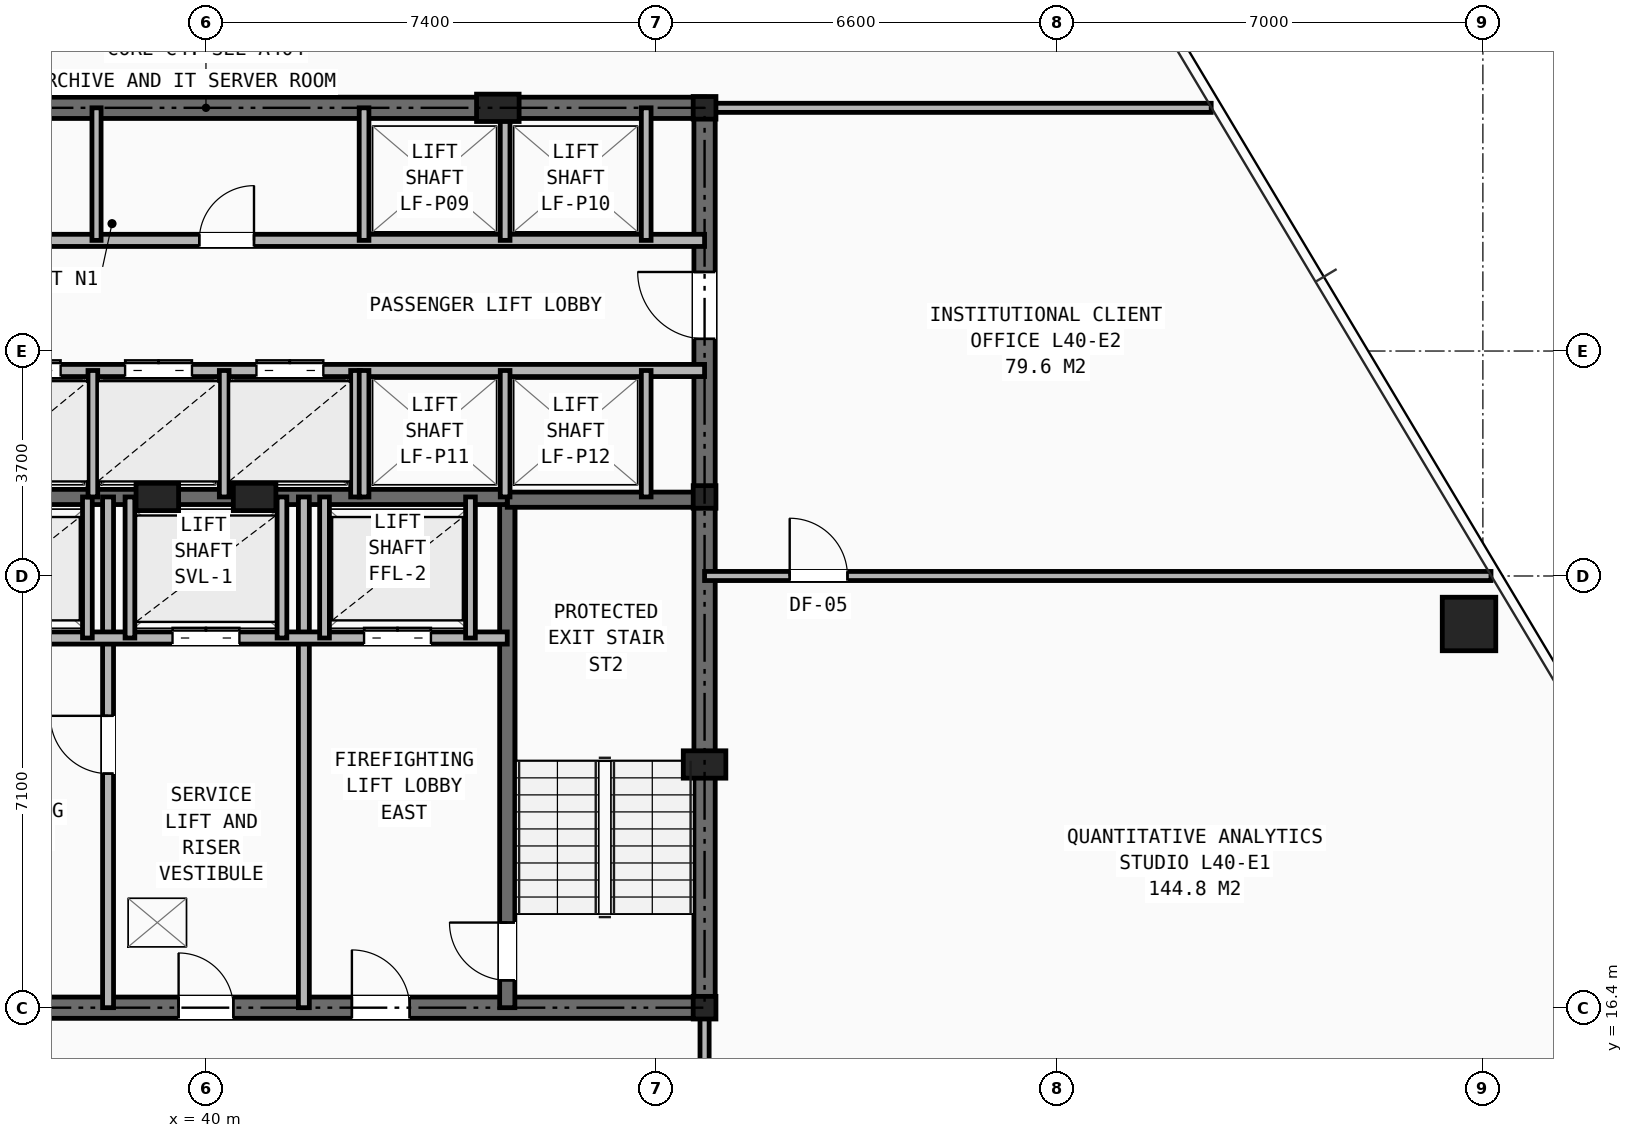
"""IFC4 building model, lengths in metres.
Left out: names, types, materials, properties, quantities, classifications, styles, units other than length and angle.
Written with IfcOpenShell. Run it as: python <this file> out.ifc"""

import sys

from ifc_helpers import new_model, si_unit, direction, frame, frame_2d, origin, origin_2d, place, context, subcontext, project, spatial, rectangle, hollow_rectangle, i_section, extrude, element, fill, save


model = new_model("IFC4")
c1 = context("Model", 3, precision=1e-05, world=origin(), true_north=direction((0.0, 1.0)))
c2 = subcontext(c1, "Body", "Model", "MODEL_VIEW")
j1 = project(units=[si_unit("LENGTHUNIT", "METRE"), si_unit("PLANEANGLEUNIT", "RADIAN")], contexts=[c1])
p1 = place(None, origin())
s1 = spatial("IfcSite", under=j1, at=p1, CompositionType="ELEMENT")
p2 = place(p1, origin())
s2 = spatial("IfcBuilding", under=s1, at=p2, CompositionType="ELEMENT")
p3 = place(p2, frame((0.0, 0.0, 140.15)))
s3 = spatial("IfcBuildingStorey", under=s2, at=p3, CompositionType="ELEMENT", Elevation=140.15)
for number, where, z_axis, x_axis in (
    (1, (48.2, 16.4, 0.0), (0.0, 0.0, 1.0), (1.0, 0.0, 0.0)),
    (2, (48.2, 24.8, 0.0), (0.0, 0.0, 1.0), (1.0, 0.0, 0.0)),
    (3, (48.2, 31.2, 0.0), (0.0, 0.0, 1.0), (1.0, 0.0, 0.0)),
):
    element("IfcColumn", number, at=place(p3, frame(where, z_axis=z_axis, x_axis=x_axis)), inside=s3, PredefinedType="COLUMN", context=c2, shape_type="SweptSolid", body=[
        extrude(i_section(OverallWidth=0.374, OverallDepth=0.372, WebThickness=0.016, FlangeThickness=0.026, at=origin_2d()), origin(), (0.0, 0.0, 1.0), 3.45),
    ])
for number, where, z_axis, x_axis in (
    (4, (48.2, 20.4, 0.0), (0.0, 0.0, 1.0), (1.0, 0.0, 0.0)),
    (5, (44.8, 31.2, 0.0), (0.0, 0.0, 1.0), (1.0, 0.0, 0.0)),
    (6, (39.2, 24.8, 0.0), (0.0, 0.0, 1.0), (1.0, 0.0, 0.0)),
    (7, (40.8, 24.8, 0.0), (0.0, 0.0, 1.0), (1.0, 0.0, 0.0)),
):
    element("IfcColumn", number, at=place(p3, frame(where, z_axis=z_axis, x_axis=x_axis)), inside=s3, PredefinedType="PILASTER", context=c2, shape_type="SweptSolid", body=[
        extrude(rectangle(XDim=0.7, YDim=0.45, at=origin_2d()), origin(), (0.0, 0.0, 1.0), 3.45),
    ])
p4 = place(p3, frame((60.772, 22.711, 0.0), z_axis=(0.0, 0.0, 1.0), x_axis=(1.0, 0.0, 0.0)))
e8 = element("IfcColumn", 8, at=p4, inside=s3, PredefinedType="COLUMN", context=c2, shape_type="SweptSolid", body=[
    extrude(hollow_rectangle(XDim=0.88, YDim=0.88, WallThickness=0.06, at=origin_2d()), origin(), (0.0, 0.0, 1.0), 3.45),
])
p5 = place(p3, frame((31.8, 16.4, 0.0), z_axis=(0.0, 0.0, 1.0), x_axis=(1.0, 0.0, 0.0)))
e9 = element("IfcWall", 9, at=p5, inside=s3, PredefinedType="SHEAR", context=c2, shape_type="SweptSolid", body=[
    extrude(rectangle(XDim=16.4, YDim=0.35, at=frame_2d((8.2, 0.0))), origin(), (0.0, 0.0, 1.0), 3.21),
])
p6 = place(p5, frame((7.75, 0.0, 0.0)))
e10 = element("IfcOpeningElement", 10, at=p6, cuts=e9, PredefinedType="OPENING", context=c2, shape_type="SweptSolid", body=[
    extrude(rectangle(XDim=0.9, YDim=2.1, at=frame_2d((0.45, 1.05))), frame((0.0, 0.185, 0.0), z_axis=(0.0, -1.0, 0.0), x_axis=(1.0, 0.0, 0.0)), (0.0, 0.0, 1.0), 0.37),
])
p7 = place(p5, frame((4.2, 0.0, 0.0)))
e11 = element("IfcOpeningElement", 11, at=p7, cuts=e9, PredefinedType="OPENING", context=c2, shape_type="SweptSolid", body=[
    extrude(rectangle(XDim=0.95, YDim=2.1, at=frame_2d((0.475, 1.05))), frame((0.0, 0.185, 0.0), z_axis=(0.0, -1.0, 0.0), x_axis=(1.0, 0.0, 0.0)), (0.0, 0.0, 1.0), 0.37),
])
p8 = place(p5, frame((10.6, 0.0, 0.0)))
e12 = element("IfcOpeningElement", 12, at=p8, cuts=e9, PredefinedType="OPENING", context=c2, shape_type="SweptSolid", body=[
    extrude(rectangle(XDim=0.95, YDim=2.1, at=frame_2d((0.475, 1.05))), frame((0.0, 0.185, 0.0), z_axis=(0.0, -1.0, 0.0), x_axis=(1.0, 0.0, 0.0)), (0.0, 0.0, 1.0), 0.37),
])
p9 = place(p3, frame((31.8, 31.2, 0.0), z_axis=(0.0, 0.0, 1.0), x_axis=(1.0, 0.0, 0.0)))
e13 = element("IfcWall", 13, at=p9, inside=s3, PredefinedType="SHEAR", context=c2, shape_type="SweptSolid", body=[
    extrude(rectangle(XDim=16.4, YDim=0.35, at=frame_2d((8.2, 0.0))), origin(), (0.0, 0.0, 1.0), 3.21),
])
p10 = place(p3, frame((48.2, 16.4, 0.0), z_axis=(0.0, 0.0, 1.0), x_axis=(0.0, 1.0, 0.0)))
e14 = element("IfcWall", 14, at=p10, inside=s3, PredefinedType="SHEAR", context=c2, shape_type="SweptSolid", body=[
    extrude(rectangle(XDim=14.8, YDim=0.35, at=frame_2d((7.4, 0.0))), origin(), (0.0, 0.0, 1.0), 3.21),
])
p11 = place(p10, frame((11.0, 0.0, 0.0)))
e15 = element("IfcOpeningElement", 15, at=p11, cuts=e14, PredefinedType="OPENING", context=c2, shape_type="SweptSolid", body=[
    extrude(rectangle(XDim=1.1, YDim=2.15, at=frame_2d((0.55, 1.075))), frame((0.0, 0.185, 0.0), z_axis=(0.0, -1.0, 0.0), x_axis=(1.0, 0.0, 0.0)), (0.0, 0.0, 1.0), 0.37),
])
p12 = place(p3, frame((44.955, 16.4, 0.0), z_axis=(0.0, 0.0, 1.0), x_axis=(0.0, 1.0, 0.0)))
e16 = element("IfcWall", 16, at=p12, inside=s3, PredefinedType="SHEAR", context=c2, shape_type="SweptSolid", body=[
    extrude(rectangle(XDim=8.4, YDim=0.25, at=frame_2d((4.2, 0.0))), origin(), (0.0, 0.0, 1.0), 3.21),
])
p13 = place(p12, frame((0.45, 0.0, 0.0)))
e17 = element("IfcOpeningElement", 17, at=p13, cuts=e16, PredefinedType="OPENING", context=c2, shape_type="SweptSolid", body=[
    extrude(rectangle(XDim=0.95, YDim=2.1, at=frame_2d((0.475, 1.05))), frame((0.0, 0.135, 0.0), z_axis=(0.0, -1.0, 0.0), x_axis=(1.0, 0.0, 0.0)), (0.0, 0.0, 1.0), 0.27),
])
p14 = place(p3, frame((44.955, 24.755, 0.0), z_axis=(0.0, 0.0, 1.0), x_axis=(1.0, 0.0, 0.0)))
e18 = element("IfcWall", 18, at=p14, inside=s3, PredefinedType="SHEAR", context=c2, shape_type="SweptSolid", body=[
    extrude(rectangle(XDim=3.245, YDim=0.25, at=frame_2d((1.623, 0.0))), origin(), (0.0, 0.0, 1.0), 3.21),
])
p15 = place(p3, frame((35.045, 24.8, 0.0), z_axis=(0.0, 0.0, 1.0), x_axis=(1.0, 0.0, 0.0)))
e19 = element("IfcWall", 19, at=p15, inside=s3, PredefinedType="SHEAR", context=c2, shape_type="SweptSolid", body=[
    extrude(rectangle(XDim=9.91, YDim=0.25, at=frame_2d((4.955, 0.0))), origin(), (0.0, 0.0, 1.0), 3.21),
])
p16 = place(p3, frame((38.39, 16.4, 0.0), z_axis=(0.0, 0.0, 1.0), x_axis=(0.0, 1.0, 0.0)))
e20 = element("IfcWall", 20, at=p16, inside=s3, PredefinedType="PARTITIONING", context=c2, shape_type="SweptSolid", body=[
    extrude(rectangle(XDim=8.4, YDim=0.18, at=frame_2d((4.2, 0.0))), origin(), (0.0, 0.0, 1.0), 2.938),
])
p17 = place(p16, frame((3.85, 0.0, 0.0)))
e21 = element("IfcOpeningElement", 21, at=p17, cuts=e20, PredefinedType="OPENING", context=c2, shape_type="SweptSolid", body=[
    extrude(rectangle(XDim=0.95, YDim=2.1, at=frame_2d((0.475, 1.05))), frame((0.0, 0.1, 0.0), z_axis=(0.0, -1.0, 0.0), x_axis=(1.0, 0.0, 0.0)), (0.0, 0.0, 1.0), 0.2),
])
p18 = place(p3, frame((41.61, 16.4, 0.0), z_axis=(0.0, 0.0, 1.0), x_axis=(0.0, 1.0, 0.0)))
e22 = element("IfcWall", 22, at=p18, inside=s3, PredefinedType="PARTITIONING", context=c2, shape_type="SweptSolid", body=[
    extrude(rectangle(XDim=8.4, YDim=0.18, at=frame_2d((4.2, 0.0))), origin(), (0.0, 0.0, 1.0), 2.938),
])
p19 = place(p3, frame((35.045, 22.48, 0.0), z_axis=(0.0, 0.0, 1.0), x_axis=(1.0, 0.0, 0.0)))
e23 = element("IfcWall", 23, at=p19, inside=s3, PredefinedType="SOLIDWALL", context=c2, shape_type="SweptSolid", body=[
    extrude(rectangle(XDim=9.91, YDim=0.2, at=frame_2d((4.955, 0.0))), origin(), (0.0, 0.0, 1.0), 3.21),
])
p20 = place(p19, frame((1.255, 0.0, 0.0)))
e24 = element("IfcOpeningElement", 24, at=p20, cuts=e23, PredefinedType="OPENING", context=c2, shape_type="SweptSolid", body=[
    extrude(rectangle(XDim=1.1, YDim=2.15, at=frame_2d((0.55, 1.075))), frame((0.0, 0.11, 0.0), z_axis=(0.0, -1.0, 0.0), x_axis=(1.0, 0.0, 0.0)), (0.0, 0.0, 1.0), 0.22),
])
p21 = place(p19, frame((7.555, 0.0, 0.0)))
e25 = element("IfcOpeningElement", 25, at=p21, cuts=e23, PredefinedType="OPENING", context=c2, shape_type="SweptSolid", body=[
    extrude(rectangle(XDim=1.1, YDim=2.15, at=frame_2d((0.55, 1.075))), frame((0.0, 0.11, 0.0), z_axis=(0.0, -1.0, 0.0), x_axis=(1.0, 0.0, 0.0)), (0.0, 0.0, 1.0), 0.22),
])
p22 = place(p19, frame((4.405, 0.0, 0.0)))
e26 = element("IfcOpeningElement", 26, at=p22, cuts=e23, PredefinedType="OPENING", context=c2, shape_type="SweptSolid", body=[
    extrude(rectangle(XDim=1.1, YDim=2.15, at=frame_2d((0.55, 1.075))), frame((0.0, 0.11, 0.0), z_axis=(0.0, -1.0, 0.0), x_axis=(1.0, 0.0, 0.0)), (0.0, 0.0, 1.0), 0.22),
])
for number, where, z_axis, x_axis in (
    (27, (38.05, 22.48, 0.0), (0.0, 0.0, 1.0), (0.0, 1.0, 0.0)),
    (28, (41.95, 22.48, 0.0), (0.0, 0.0, 1.0), (0.0, 1.0, 0.0)),
    (29, (44.35, 22.48, 0.0), (0.0, 0.0, 1.0), (0.0, 1.0, 0.0)),
    (30, (38.75, 22.48, 0.0), (0.0, 0.0, 1.0), (0.0, 1.0, 0.0)),
    (31, (41.25, 22.48, 0.0), (0.0, 0.0, 1.0), (0.0, 1.0, 0.0)),
):
    element("IfcWall", number, at=place(p3, frame(where, z_axis=z_axis, x_axis=x_axis)), inside=s3, PredefinedType="SOLIDWALL", context=c2, shape_type="SweptSolid", body=[
        extrude(rectangle(XDim=2.32, YDim=0.16, at=frame_2d((1.16, 0.0))), origin(), (0.0, 0.0, 1.0), 3.21),
    ])
p23 = place(p3, frame((33.82, 29.02, 0.0), z_axis=(0.0, 0.0, 1.0), x_axis=(1.0, 0.0, 0.0)))
e32 = element("IfcWall", 32, at=p23, inside=s3, PredefinedType="SOLIDWALL", context=c2, shape_type="SweptSolid", body=[
    extrude(rectangle(XDim=14.38, YDim=0.2, at=frame_2d((7.19, 0.0))), origin(), (0.0, 0.0, 1.0), 2.661),
])
p24 = place(p23, frame((1.78, 0.0, 0.0)))
e33 = element("IfcOpeningElement", 33, at=p24, cuts=e32, PredefinedType="OPENING", context=c2, shape_type="SweptSolid", body=[
    extrude(rectangle(XDim=0.9, YDim=2.1, at=frame_2d((0.45, 1.05))), frame((0.0, 0.11, 0.0), z_axis=(0.0, -1.0, 0.0), x_axis=(1.0, 0.0, 0.0)), (0.0, 0.0, 1.0), 0.22),
])
p25 = place(p23, frame((6.07, 0.0, 0.0)))
e34 = element("IfcOpeningElement", 34, at=p25, cuts=e32, PredefinedType="OPENING", context=c2, shape_type="SweptSolid", body=[
    extrude(rectangle(XDim=0.9, YDim=2.1, at=frame_2d((0.45, 1.05))), frame((0.0, 0.11, 0.0), z_axis=(0.0, -1.0, 0.0), x_axis=(1.0, 0.0, 0.0)), (0.0, 0.0, 1.0), 0.22),
])
p26 = place(p3, frame((31.8, 26.88, 0.0), z_axis=(0.0, 0.0, 1.0), x_axis=(1.0, 0.0, 0.0)))
e35 = element("IfcWall", 35, at=p26, inside=s3, PredefinedType="SOLIDWALL", context=c2, shape_type="SweptSolid", body=[
    extrude(rectangle(XDim=16.4, YDim=0.2, at=frame_2d((8.2, 0.0))), origin(), (0.0, 0.0, 1.0), 2.661),
])
p27 = place(p26, frame((0.55, 0.0, 0.0)))
e36 = element("IfcOpeningElement", 36, at=p27, cuts=e35, PredefinedType="OPENING", context=c2, shape_type="SweptSolid", body=[
    extrude(rectangle(XDim=0.85, YDim=2.05, at=frame_2d((0.425, 1.025))), frame((0.0, 0.11, 0.0), z_axis=(0.0, -1.0, 0.0), x_axis=(1.0, 0.0, 0.0)), (0.0, 0.0, 1.0), 0.22),
])
p28 = place(p26, frame((2.55, 0.0, 0.0)))
e37 = element("IfcOpeningElement", 37, at=p28, cuts=e35, PredefinedType="OPENING", context=c2, shape_type="SweptSolid", body=[
    extrude(rectangle(XDim=1.1, YDim=2.15, at=frame_2d((0.55, 1.075))), frame((0.0, 0.11, 0.0), z_axis=(0.0, -1.0, 0.0), x_axis=(1.0, 0.0, 0.0)), (0.0, 0.0, 1.0), 0.22),
])
p29 = place(p26, frame((4.71, 0.0, 0.0)))
e38 = element("IfcOpeningElement", 38, at=p29, cuts=e35, PredefinedType="OPENING", context=c2, shape_type="SweptSolid", body=[
    extrude(rectangle(XDim=1.1, YDim=2.15, at=frame_2d((0.55, 1.075))), frame((0.0, 0.11, 0.0), z_axis=(0.0, -1.0, 0.0), x_axis=(1.0, 0.0, 0.0)), (0.0, 0.0, 1.0), 0.22),
])
p30 = place(p26, frame((6.87, 0.0, 0.0)))
e39 = element("IfcOpeningElement", 39, at=p30, cuts=e35, PredefinedType="OPENING", context=c2, shape_type="SweptSolid", body=[
    extrude(rectangle(XDim=1.1, YDim=2.15, at=frame_2d((0.55, 1.075))), frame((0.0, 0.11, 0.0), z_axis=(0.0, -1.0, 0.0), x_axis=(1.0, 0.0, 0.0)), (0.0, 0.0, 1.0), 0.22),
])
p31 = place(p26, frame((9.03, 0.0, 0.0)))
e40 = element("IfcOpeningElement", 40, at=p31, cuts=e35, PredefinedType="OPENING", context=c2, shape_type="SweptSolid", body=[
    extrude(rectangle(XDim=1.1, YDim=2.15, at=frame_2d((0.55, 1.075))), frame((0.0, 0.11, 0.0), z_axis=(0.0, -1.0, 0.0), x_axis=(1.0, 0.0, 0.0)), (0.0, 0.0, 1.0), 0.22),
])
p32 = place(p3, frame((38.2, 29.02, 0.0), z_axis=(0.0, 0.0, 1.0), x_axis=(0.0, 1.0, 0.0)))
e41 = element("IfcWall", 41, at=p32, inside=s3, PredefinedType="PARTITIONING", context=c2, shape_type="SweptSolid", body=[
    extrude(rectangle(XDim=2.18, YDim=0.15, at=frame_2d((1.09, 0.0))), origin(), (0.0, 0.0, 1.0), 2.938),
])
for number, where, z_axis, x_axis in (
    (42, (38.14, 24.8, 0.0), (0.0, 0.0, 1.0), (0.0, 1.0, 0.0)),
    (43, (40.3, 24.8, 0.0), (0.0, 0.0, 1.0), (0.0, 1.0, 0.0)),
    (44, (42.46, 24.8, 0.0), (0.0, 0.0, 1.0), (0.0, 1.0, 0.0)),
):
    element("IfcWall", number, at=place(p3, frame(where, z_axis=z_axis, x_axis=x_axis)), inside=s3, PredefinedType="SOLIDWALL", context=c2, shape_type="SweptSolid", body=[
        extrude(rectangle(XDim=2.08, YDim=0.16, at=frame_2d((1.04, 0.0))), origin(), (0.0, 0.0, 1.0), 3.21),
    ])
for number, where, z_axis, x_axis in (
    (45, (42.6, 29.02, 0.0), (0.0, 0.0, 1.0), (0.0, 1.0, 0.0)),
    (46, (44.92, 29.02, 0.0), (0.0, 0.0, 1.0), (0.0, 1.0, 0.0)),
    (47, (47.24, 29.02, 0.0), (0.0, 0.0, 1.0), (0.0, 1.0, 0.0)),
):
    element("IfcWall", number, at=place(p3, frame(where, z_axis=z_axis, x_axis=x_axis)), inside=s3, PredefinedType="SOLIDWALL", context=c2, shape_type="SweptSolid", body=[
        extrude(rectangle(XDim=2.18, YDim=0.16, at=frame_2d((1.09, 0.0))), origin(), (0.0, 0.0, 1.0), 2.938),
    ])
for number, where, z_axis, x_axis in (
    (48, (42.6, 24.8, 0.0), (0.0, 0.0, 1.0), (0.0, 1.0, 0.0)),
    (49, (44.92, 24.8, 0.0), (0.0, 0.0, 1.0), (0.0, 1.0, 0.0)),
    (50, (47.24, 24.8, 0.0), (0.0, 0.0, 1.0), (0.0, 1.0, 0.0)),
):
    element("IfcWall", number, at=place(p3, frame(where, z_axis=z_axis, x_axis=x_axis)), inside=s3, PredefinedType="SOLIDWALL", context=c2, shape_type="SweptSolid", body=[
        extrude(rectangle(XDim=2.08, YDim=0.16, at=frame_2d((1.04, 0.0))), origin(), (0.0, 0.0, 1.0), 3.21),
    ])
p33 = place(p3, frame((48.2, 14.1, 0.0), z_axis=(0.0, 0.0, 1.0), x_axis=(0.0, 1.0, 0.0)))
e51 = element("IfcWall", 51, at=p33, inside=s3, PredefinedType="PARTITIONING", context=c2, shape_type="SweptSolid", body=[
    extrude(rectangle(XDim=2.3, YDim=0.15, at=frame_2d((1.15, 0.0))), origin(), (0.0, 0.0, 1.0), 2.661),
])
p34 = place(p3, frame((48.2, 31.2, 0.0), z_axis=(0.0, 0.0, 1.0), x_axis=(1.0, 0.0, 0.0)))
e52 = element("IfcWall", 52, at=p34, inside=s3, PredefinedType="PARTITIONING", context=c2, shape_type="SweptSolid", body=[
    extrude(rectangle(XDim=8.332, YDim=0.15, at=frame_2d((4.166, 0.0))), origin(), (0.0, 0.0, 1.0), 2.252),
])
p35 = place(p3, frame((48.2, 23.5, 0.0), z_axis=(0.0, 0.0, 1.0), x_axis=(1.0, 0.0, 0.0)))
e53 = element("IfcWall", 53, at=p35, inside=s3, PredefinedType="PARTITIONING", context=c2, shape_type="SweptSolid", body=[
    extrude(rectangle(XDim=12.933, YDim=0.15, at=frame_2d((6.467, 0.0))), origin(), (0.0, 0.0, 1.0), 2.589),
])
p36 = place(p35, frame((1.4, 0.0, 0.0)))
e54 = element("IfcOpeningElement", 54, at=p36, cuts=e53, PredefinedType="OPENING", context=c2, shape_type="SweptSolid", body=[
    extrude(rectangle(XDim=0.95, YDim=2.1, at=frame_2d((0.475, 1.05))), frame((0.0, 0.085, 0.0), z_axis=(0.0, -1.0, 0.0), x_axis=(1.0, 0.0, 0.0)), (0.0, 0.0, 1.0), 0.17),
])
p37 = place(p6, origin())
e55 = element("IfcDoor", 55, at=p37, inside=s3, OperationType="SINGLE_SWING_LEFT", PredefinedType="DOOR", context=c2, shape_type="SweptSolid", body=[
    extrude(rectangle(XDim=0.9, YDim=2.1, at=frame_2d((0.45, 1.05))), frame((0.0, 0.025, 0.0), z_axis=(0.0, -1.0, 0.0), x_axis=(1.0, 0.0, 0.0)), (0.0, 0.0, 1.0), 0.05),
])
fill(e10, e55)
p38 = place(p17, origin())
e56 = element("IfcDoor", 56, at=p38, inside=s3, OperationType="SINGLE_SWING_RIGHT", PredefinedType="DOOR", context=c2, shape_type="SweptSolid", body=[
    extrude(rectangle(XDim=0.95, YDim=2.1, at=frame_2d((0.475, 1.05))), frame((0.0, 0.025, 0.0), z_axis=(0.0, -1.0, 0.0), x_axis=(1.0, 0.0, 0.0)), (0.0, 0.0, 1.0), 0.05),
])
fill(e21, e56)
p39 = place(p13, origin())
e57 = element("IfcDoor", 57, at=p39, inside=s3, OperationType="SINGLE_SWING_RIGHT", PredefinedType="DOOR", context=c2, shape_type="SweptSolid", body=[
    extrude(rectangle(XDim=0.95, YDim=2.1, at=frame_2d((0.475, 1.05))), frame((0.0, 0.025, 0.0), z_axis=(0.0, -1.0, 0.0), x_axis=(1.0, 0.0, 0.0)), (0.0, 0.0, 1.0), 0.05),
])
fill(e17, e57)
p40 = place(p8, origin())
e58 = element("IfcDoor", 58, at=p40, inside=s3, OperationType="SINGLE_SWING_LEFT", PredefinedType="DOOR", context=c2, shape_type="SweptSolid", body=[
    extrude(rectangle(XDim=0.95, YDim=2.1, at=frame_2d((0.475, 1.05))), frame((0.0, 0.025, 0.0), z_axis=(0.0, -1.0, 0.0), x_axis=(1.0, 0.0, 0.0)), (0.0, 0.0, 1.0), 0.05),
])
fill(e12, e58)
p41 = place(p21, origin())
e59 = element("IfcDoor", 59, at=p41, inside=s3, OperationType="DOUBLE_DOOR_SLIDING", PredefinedType="DOOR", context=c2, shape_type="SweptSolid", body=[
    extrude(rectangle(XDim=1.1, YDim=2.15, at=frame_2d((0.55, 1.075))), frame((0.0, 0.025, 0.0), z_axis=(0.0, -1.0, 0.0), x_axis=(1.0, 0.0, 0.0)), (0.0, 0.0, 1.0), 0.05),
])
fill(e25, e59)
p42 = place(p22, origin())
e60 = element("IfcDoor", 60, at=p42, inside=s3, OperationType="DOUBLE_DOOR_SLIDING", PredefinedType="DOOR", context=c2, shape_type="SweptSolid", body=[
    extrude(rectangle(XDim=1.1, YDim=2.15, at=frame_2d((0.55, 1.075))), frame((0.0, 0.025, 0.0), z_axis=(0.0, -1.0, 0.0), x_axis=(1.0, 0.0, 0.0)), (0.0, 0.0, 1.0), 0.05),
])
fill(e26, e60)
p43 = place(p11, origin())
e61 = element("IfcDoor", 61, at=p43, inside=s3, OperationType="SINGLE_SWING_RIGHT", PredefinedType="DOOR", context=c2, shape_type="SweptSolid", body=[
    extrude(rectangle(XDim=1.1, YDim=2.15, at=frame_2d((0.55, 1.075))), frame((0.0, 0.025, 0.0), z_axis=(0.0, -1.0, 0.0), x_axis=(1.0, 0.0, 0.0)), (0.0, 0.0, 1.0), 0.05),
])
fill(e15, e61)
p44 = place(p25, origin())
e62 = element("IfcDoor", 62, at=p44, inside=s3, OperationType="SINGLE_SWING_RIGHT", PredefinedType="DOOR", context=c2, shape_type="SweptSolid", body=[
    extrude(rectangle(XDim=0.9, YDim=2.1, at=frame_2d((0.45, 1.05))), frame((0.0, 0.025, 0.0), z_axis=(0.0, -1.0, 0.0), x_axis=(1.0, 0.0, 0.0)), (0.0, 0.0, 1.0), 0.05),
])
fill(e34, e62)
p45 = place(p29, origin())
e63 = element("IfcDoor", 63, at=p45, inside=s3, OperationType="DOUBLE_DOOR_SLIDING", PredefinedType="DOOR", context=c2, shape_type="SweptSolid", body=[
    extrude(rectangle(XDim=1.1, YDim=2.15, at=frame_2d((0.55, 1.075))), frame((0.0, 0.025, 0.0), z_axis=(0.0, -1.0, 0.0), x_axis=(1.0, 0.0, 0.0)), (0.0, 0.0, 1.0), 0.05),
])
fill(e38, e63)
p46 = place(p30, origin())
e64 = element("IfcDoor", 64, at=p46, inside=s3, OperationType="DOUBLE_DOOR_SLIDING", PredefinedType="DOOR", context=c2, shape_type="SweptSolid", body=[
    extrude(rectangle(XDim=1.1, YDim=2.15, at=frame_2d((0.55, 1.075))), frame((0.0, 0.025, 0.0), z_axis=(0.0, -1.0, 0.0), x_axis=(1.0, 0.0, 0.0)), (0.0, 0.0, 1.0), 0.05),
])
fill(e39, e64)
p47 = place(p31, origin())
e65 = element("IfcDoor", 65, at=p47, inside=s3, OperationType="DOUBLE_DOOR_SLIDING", PredefinedType="DOOR", context=c2, shape_type="SweptSolid", body=[
    extrude(rectangle(XDim=1.1, YDim=2.15, at=frame_2d((0.55, 1.075))), frame((0.0, 0.025, 0.0), z_axis=(0.0, -1.0, 0.0), x_axis=(1.0, 0.0, 0.0)), (0.0, 0.0, 1.0), 0.05),
])
fill(e40, e65)
p48 = place(p36, origin())
e66 = element("IfcDoor", 66, at=p48, inside=s3, OperationType="SINGLE_SWING_LEFT", PredefinedType="DOOR", context=c2, shape_type="SweptSolid", body=[
    extrude(rectangle(XDim=0.95, YDim=2.1, at=frame_2d((0.475, 1.05))), frame((0.0, 0.025, 0.0), z_axis=(0.0, -1.0, 0.0), x_axis=(1.0, 0.0, 0.0)), (0.0, 0.0, 1.0), 0.05),
])
fill(e54, e66)
save(model, sys.argv[1])
